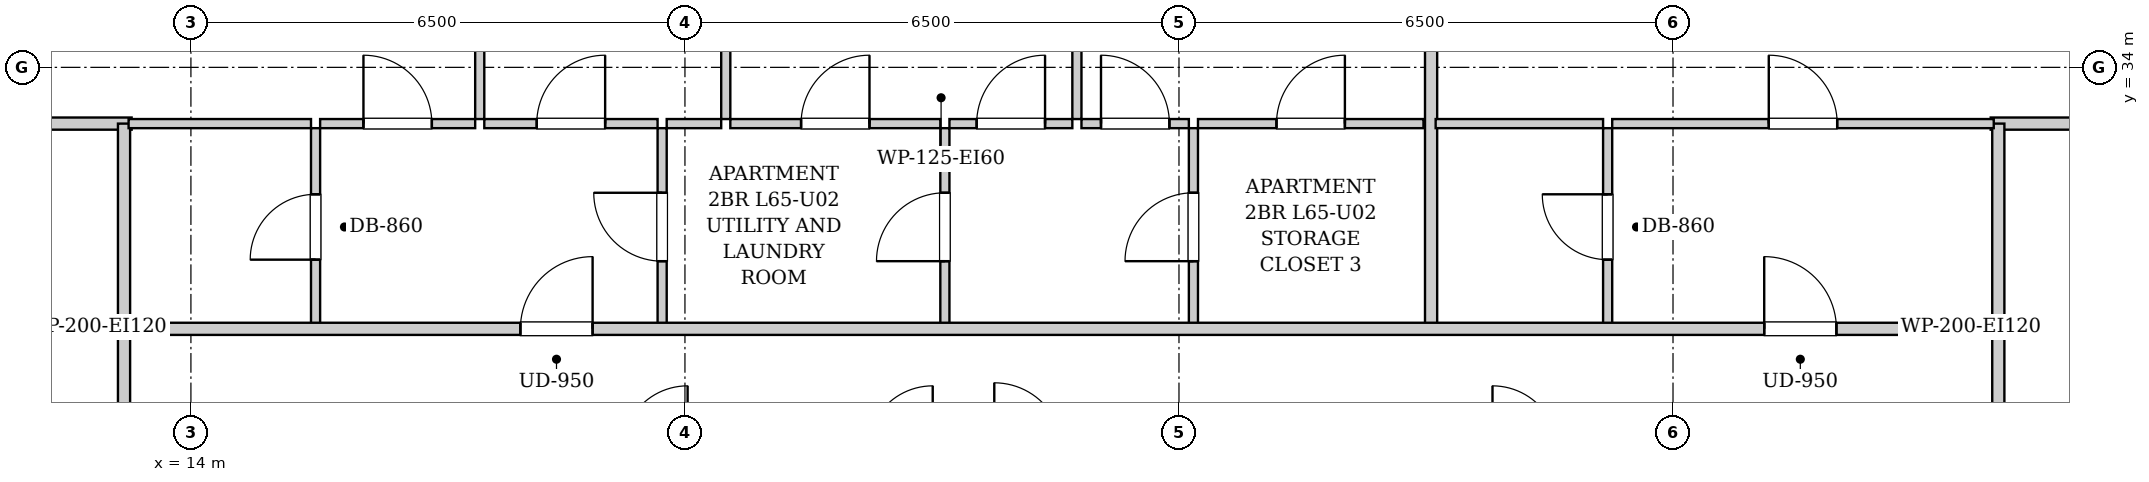
"""IFC4 building model, lengths in metres.
Left out: names, types, materials, properties, quantities, classifications, styles, units other than length and angle.
Written with IfcOpenShell. Run it as: python <this file> out.ifc"""

import sys

from ifc_helpers import new_model, si_unit, direction, frame, frame_2d, origin, place, context, subcontext, project, spatial, rectangle, extrude, element, fill, save


model = new_model("IFC4")
c1 = context("Model", 3, precision=1e-05, world=origin(), true_north=direction((0.0, 1.0)))
c2 = subcontext(c1, "Body", "Model", "MODEL_VIEW")
j1 = project(units=[si_unit("LENGTHUNIT", "METRE"), si_unit("PLANEANGLEUNIT", "RADIAN")], contexts=[c1])
p1 = place(None, origin())
s1 = spatial("IfcSite", under=j1, at=p1, CompositionType="ELEMENT")
p2 = place(p1, origin())
s2 = spatial("IfcBuilding", under=s1, at=p2, CompositionType="ELEMENT")
p3 = place(p2, frame((0.0, 0.0, 224.1)))
s3 = spatial("IfcBuildingStorey", under=s2, at=p3, CompositionType="ELEMENT", Elevation=224.1)
for number, where, z_axis, x_axis in (
    (1, (13.12, 28.98, 0.0), (0.0, 0.0, 1.0), (0.0, 1.0, 0.0)),
    (2, (37.78, 28.98, 0.0), (0.0, 0.0, 1.0), (0.0, 1.0, 0.0)),
):
    element("IfcWall", number, at=place(p3, frame(where, z_axis=z_axis, x_axis=x_axis)), inside=s3, PredefinedType="PARTITIONING", context=c2, shape_type="SweptSolid", body=[
        extrude(rectangle(XDim=1.58, YDim=0.16, at=frame_2d((0.79, 0.0))), origin(), (0.0, 0.0, 1.0), 3.14),
    ])
p4 = place(p3, frame((10.88, 33.26, 0.0), z_axis=(0.0, 0.0, 1.0), x_axis=(1.0, 0.0, 0.0)))
e3 = element("IfcWall", 3, at=p4, inside=s3, PredefinedType="PARTITIONING", context=c2, shape_type="SweptSolid", body=[
    extrude(rectangle(XDim=2.34, YDim=0.16, at=frame_2d((1.17, 0.0))), origin(), (0.0, 0.0, 1.0), 3.14),
])
p5 = place(p3, frame((13.12, 30.6, 0.0), z_axis=(0.0, 0.0, 1.0), x_axis=(0.0, 1.0, 0.0)))
e4 = element("IfcWall", 4, at=p5, inside=s3, PredefinedType="PARTITIONING", context=c2, shape_type="SweptSolid", body=[
    extrude(rectangle(XDim=2.66, YDim=0.16, at=frame_2d((1.33, 0.0))), origin(), (0.0, 0.0, 1.0), 3.14),
])
p6 = place(p3, frame((15.64, 30.6, 0.0), z_axis=(0.0, 0.0, 1.0), x_axis=(0.0, 1.0, 0.0)))
e5 = element("IfcWall", 5, at=p6, inside=s3, PredefinedType="PARTITIONING", context=c2, shape_type="SweptSolid", body=[
    extrude(rectangle(XDim=2.6, YDim=0.12, at=frame_2d((1.3, 0.0))), origin(), (0.0, 0.0, 1.0), 3.14),
])
p7 = place(p6, frame((0.87, 0.0, 0.0)))
e6 = element("IfcOpeningElement", 6, at=p7, cuts=e5, PredefinedType="OPENING", context=c2, shape_type="SweptSolid", body=[
    extrude(rectangle(XDim=0.86, YDim=2.05, at=frame_2d((0.43, 1.025))), frame((0.0, 0.07, 0.0), z_axis=(0.0, -1.0, 0.0), x_axis=(1.0, 0.0, 0.0)), (0.0, 0.0, 1.0), 0.14),
])
p8 = place(p3, frame((13.18, 33.26, 0.0), z_axis=(0.0, 0.0, 1.0), x_axis=(1.0, 0.0, 0.0)))
e7 = element("IfcWall", 7, at=p8, inside=s3, PredefinedType="PARTITIONING", context=c2, shape_type="SweptSolid", body=[
    extrude(rectangle(XDim=2.4, YDim=0.12, at=frame_2d((1.2, 0.0))), origin(), (0.0, 0.0, 1.0), 3.14),
])
p9 = place(p3, frame((20.2, 30.6, 0.0), z_axis=(0.0, 0.0, 1.0), x_axis=(0.0, 1.0, 0.0)))
e8 = element("IfcWall", 8, at=p9, inside=s3, PredefinedType="PARTITIONING", context=c2, shape_type="SweptSolid", body=[
    extrude(rectangle(XDim=2.6, YDim=0.12, at=frame_2d((1.3, 0.0))), origin(), (0.0, 0.0, 1.0), 3.14),
])
p10 = place(p9, frame((0.85, 0.0, 0.0)))
e9 = element("IfcOpeningElement", 9, at=p10, cuts=e8, PredefinedType="OPENING", context=c2, shape_type="SweptSolid", body=[
    extrude(rectangle(XDim=0.9, YDim=2.05, at=frame_2d((0.45, 1.025))), frame((0.0, 0.07, 0.0), z_axis=(0.0, -1.0, 0.0), x_axis=(1.0, 0.0, 0.0)), (0.0, 0.0, 1.0), 0.14),
])
p11 = place(p3, frame((15.7, 33.26, 0.0), z_axis=(0.0, 0.0, 1.0), x_axis=(1.0, 0.0, 0.0)))
e10 = element("IfcWall", 10, at=p11, inside=s3, PredefinedType="PARTITIONING", context=c2, shape_type="SweptSolid", body=[
    extrude(rectangle(XDim=2.04, YDim=0.12, at=frame_2d((1.02, 0.0))), origin(), (0.0, 0.0, 1.0), 3.14),
])
p12 = place(p11, frame((0.57, 0.0, 0.0)))
e11 = element("IfcOpeningElement", 11, at=p12, cuts=e10, PredefinedType="OPENING", context=c2, shape_type="SweptSolid", body=[
    extrude(rectangle(XDim=0.9, YDim=2.05, at=frame_2d((0.45, 1.025))), frame((0.0, 0.07, 0.0), z_axis=(0.0, -1.0, 0.0), x_axis=(1.0, 0.0, 0.0)), (0.0, 0.0, 1.0), 0.14),
])
p13 = place(p3, frame((17.86, 33.26, 0.0), z_axis=(0.0, 0.0, 1.0), x_axis=(1.0, 0.0, 0.0)))
e12 = element("IfcWall", 12, at=p13, inside=s3, PredefinedType="PARTITIONING", context=c2, shape_type="SweptSolid", body=[
    extrude(rectangle(XDim=2.28, YDim=0.12, at=frame_2d((1.14, 0.0))), origin(), (0.0, 0.0, 1.0), 3.14),
])
p14 = place(p13, frame((0.69, 0.0, 0.0)))
e13 = element("IfcOpeningElement", 13, at=p14, cuts=e12, PredefinedType="OPENING", context=c2, shape_type="SweptSolid", body=[
    extrude(rectangle(XDim=0.9, YDim=2.05, at=frame_2d((0.45, 1.025))), frame((0.0, 0.07, 0.0), z_axis=(0.0, -1.0, 0.0), x_axis=(1.0, 0.0, 0.0)), (0.0, 0.0, 1.0), 0.14),
])
p15 = place(p3, frame((23.92, 30.6, 0.0), z_axis=(0.0, 0.0, 1.0), x_axis=(0.0, 1.0, 0.0)))
e14 = element("IfcWall", 14, at=p15, inside=s3, PredefinedType="PARTITIONING", context=c2, shape_type="SweptSolid", body=[
    extrude(rectangle(XDim=2.6, YDim=0.12, at=frame_2d((1.3, 0.0))), origin(), (0.0, 0.0, 1.0), 3.14),
])
p16 = place(p15, frame((0.85, 0.0, 0.0)))
e15 = element("IfcOpeningElement", 15, at=p16, cuts=e14, PredefinedType="OPENING", context=c2, shape_type="SweptSolid", body=[
    extrude(rectangle(XDim=0.9, YDim=2.05, at=frame_2d((0.45, 1.025))), frame((0.0, 0.07, 0.0), z_axis=(0.0, -1.0, 0.0), x_axis=(1.0, 0.0, 0.0)), (0.0, 0.0, 1.0), 0.14),
])
p17 = place(p3, frame((20.26, 33.26, 0.0), z_axis=(0.0, 0.0, 1.0), x_axis=(1.0, 0.0, 0.0)))
e16 = element("IfcWall", 16, at=p17, inside=s3, PredefinedType="PARTITIONING", context=c2, shape_type="SweptSolid", body=[
    extrude(rectangle(XDim=0.717, YDim=0.12, at=frame_2d((0.358, 0.0))), origin(), (0.0, 0.0, 1.0), 3.14),
])
p18 = place(p3, frame((21.097, 33.26, 0.0), z_axis=(0.0, 0.0, 1.0), x_axis=(1.0, 0.0, 0.0)))
e17 = element("IfcWall", 17, at=p18, inside=s3, PredefinedType="PARTITIONING", context=c2, shape_type="SweptSolid", body=[
    extrude(rectangle(XDim=2.763, YDim=0.12, at=frame_2d((1.382, 0.0))), origin(), (0.0, 0.0, 1.0), 3.14),
])
p19 = place(p18, frame((0.931, 0.0, 0.0)))
e18 = element("IfcOpeningElement", 18, at=p19, cuts=e17, PredefinedType="OPENING", context=c2, shape_type="SweptSolid", body=[
    extrude(rectangle(XDim=0.9, YDim=2.05, at=frame_2d((0.45, 1.025))), frame((0.0, 0.07, 0.0), z_axis=(0.0, -1.0, 0.0), x_axis=(1.0, 0.0, 0.0)), (0.0, 0.0, 1.0), 0.14),
])
p20 = place(p3, frame((27.19, 30.6, 0.0), z_axis=(0.0, 0.0, 1.0), x_axis=(0.0, 1.0, 0.0)))
e19 = element("IfcWall", 19, at=p20, inside=s3, PredefinedType="PARTITIONING", context=c2, shape_type="SweptSolid", body=[
    extrude(rectangle(XDim=2.6, YDim=0.12, at=frame_2d((1.3, 0.0))), origin(), (0.0, 0.0, 1.0), 3.14),
])
p21 = place(p20, frame((0.85, 0.0, 0.0)))
e20 = element("IfcOpeningElement", 20, at=p21, cuts=e19, PredefinedType="OPENING", context=c2, shape_type="SweptSolid", body=[
    extrude(rectangle(XDim=0.9, YDim=2.05, at=frame_2d((0.45, 1.025))), frame((0.0, 0.07, 0.0), z_axis=(0.0, -1.0, 0.0), x_axis=(1.0, 0.0, 0.0)), (0.0, 0.0, 1.0), 0.14),
])
p22 = place(p3, frame((23.98, 33.26, 0.0), z_axis=(0.0, 0.0, 1.0), x_axis=(1.0, 0.0, 0.0)))
e21 = element("IfcWall", 21, at=p22, inside=s3, PredefinedType="PARTITIONING", context=c2, shape_type="SweptSolid", body=[
    extrude(rectangle(XDim=1.617, YDim=0.12, at=frame_2d((0.809, 0.0))), origin(), (0.0, 0.0, 1.0), 3.14),
])
p23 = place(p22, frame((0.358, 0.0, 0.0)))
e22 = element("IfcOpeningElement", 22, at=p23, cuts=e21, PredefinedType="OPENING", context=c2, shape_type="SweptSolid", body=[
    extrude(rectangle(XDim=0.9, YDim=2.05, at=frame_2d((0.45, 1.025))), frame((0.0, 0.07, 0.0), z_axis=(0.0, -1.0, 0.0), x_axis=(1.0, 0.0, 0.0)), (0.0, 0.0, 1.0), 0.14),
])
p24 = place(p3, frame((25.717, 33.26, 0.0), z_axis=(0.0, 0.0, 1.0), x_axis=(1.0, 0.0, 0.0)))
e23 = element("IfcWall", 23, at=p24, inside=s3, PredefinedType="PARTITIONING", context=c2, shape_type="SweptSolid", body=[
    extrude(rectangle(XDim=1.413, YDim=0.12, at=frame_2d((0.707, 0.0))), origin(), (0.0, 0.0, 1.0), 3.14),
])
p25 = place(p24, frame((0.257, 0.0, 0.0)))
e24 = element("IfcOpeningElement", 24, at=p25, cuts=e23, PredefinedType="OPENING", context=c2, shape_type="SweptSolid", body=[
    extrude(rectangle(XDim=0.9, YDim=2.05, at=frame_2d((0.45, 1.025))), frame((0.0, 0.07, 0.0), z_axis=(0.0, -1.0, 0.0), x_axis=(1.0, 0.0, 0.0)), (0.0, 0.0, 1.0), 0.14),
])
p26 = place(p3, frame((27.25, 33.26, 0.0), z_axis=(0.0, 0.0, 1.0), x_axis=(1.0, 0.0, 0.0)))
e25 = element("IfcWall", 25, at=p26, inside=s3, PredefinedType="PARTITIONING", context=c2, shape_type="SweptSolid", body=[
    extrude(rectangle(XDim=2.967, YDim=0.12, at=frame_2d((1.483, 0.0))), origin(), (0.0, 0.0, 1.0), 3.14),
])
p27 = place(p26, frame((1.033, 0.0, 0.0)))
e26 = element("IfcOpeningElement", 26, at=p27, cuts=e25, PredefinedType="OPENING", context=c2, shape_type="SweptSolid", body=[
    extrude(rectangle(XDim=0.9, YDim=2.05, at=frame_2d((0.45, 1.025))), frame((0.0, 0.07, 0.0), z_axis=(0.0, -1.0, 0.0), x_axis=(1.0, 0.0, 0.0)), (0.0, 0.0, 1.0), 0.14),
])
p28 = place(p3, frame((17.8, 33.32, 0.0), z_axis=(0.0, 0.0, 1.0), x_axis=(0.0, 1.0, 0.0)))
e27 = element("IfcWall", 27, at=p28, inside=s3, PredefinedType="PARTITIONING", context=c2, shape_type="SweptSolid", body=[
    extrude(rectangle(XDim=6.6, YDim=0.12, at=frame_2d((3.3, 0.0))), origin(), (0.0, 0.0, 1.0), 2.668),
])
p29 = place(p28, frame((2.835, 0.0, 0.0)))
e28 = element("IfcOpeningElement", 28, at=p29, cuts=e27, PredefinedType="OPENING", context=c2, shape_type="SweptSolid", body=[
    extrude(rectangle(XDim=0.9, YDim=2.05, at=frame_2d((0.45, 1.025))), frame((0.0, 0.07, 0.0), z_axis=(0.0, -1.0, 0.0), x_axis=(1.0, 0.0, 0.0)), (0.0, 0.0, 1.0), 0.14),
])
p30 = place(p3, frame((21.037, 33.32, 0.0), z_axis=(0.0, 0.0, 1.0), x_axis=(0.0, 1.0, 0.0)))
e29 = element("IfcWall", 29, at=p30, inside=s3, PredefinedType="PARTITIONING", context=c2, shape_type="SweptSolid", body=[
    extrude(rectangle(XDim=6.6, YDim=0.12, at=frame_2d((3.3, 0.0))), origin(), (0.0, 0.0, 1.0), 3.14),
])
p31 = place(p30, frame((2.835, 0.0, 0.0)))
e30 = element("IfcOpeningElement", 30, at=p31, cuts=e29, PredefinedType="OPENING", context=c2, shape_type="SweptSolid", body=[
    extrude(rectangle(XDim=0.9, YDim=2.05, at=frame_2d((0.45, 1.025))), frame((0.0, 0.07, 0.0), z_axis=(0.0, -1.0, 0.0), x_axis=(1.0, 0.0, 0.0)), (0.0, 0.0, 1.0), 0.14),
])
p32 = place(p3, frame((25.657, 33.32, 0.0), z_axis=(0.0, 0.0, 1.0), x_axis=(0.0, 1.0, 0.0)))
e31 = element("IfcWall", 31, at=p32, inside=s3, PredefinedType="PARTITIONING", context=c2, shape_type="SweptSolid", body=[
    extrude(rectangle(XDim=6.6, YDim=0.12, at=frame_2d((3.3, 0.0))), origin(), (0.0, 0.0, 1.0), 3.14),
])
p33 = place(p32, frame((2.835, 0.0, 0.0)))
e32 = element("IfcOpeningElement", 32, at=p33, cuts=e31, PredefinedType="OPENING", context=c2, shape_type="SweptSolid", body=[
    extrude(rectangle(XDim=0.9, YDim=2.05, at=frame_2d((0.45, 1.025))), frame((0.0, 0.07, 0.0), z_axis=(0.0, -1.0, 0.0), x_axis=(1.0, 0.0, 0.0)), (0.0, 0.0, 1.0), 0.14),
])
p34 = place(p3, frame((37.68, 33.26, 0.0), z_axis=(0.0, 0.0, 1.0), x_axis=(1.0, 0.0, 0.0)))
e33 = element("IfcWall", 33, at=p34, inside=s3, PredefinedType="PARTITIONING", context=c2, shape_type="SweptSolid", body=[
    extrude(rectangle(XDim=2.34, YDim=0.16, at=frame_2d((1.17, 0.0))), origin(), (0.0, 0.0, 1.0), 3.14),
])
p35 = place(p3, frame((37.78, 30.6, 0.0), z_axis=(0.0, 0.0, 1.0), x_axis=(0.0, 1.0, 0.0)))
e34 = element("IfcWall", 34, at=p35, inside=s3, PredefinedType="PARTITIONING", context=c2, shape_type="SweptSolid", body=[
    extrude(rectangle(XDim=2.66, YDim=0.16, at=frame_2d((1.33, 0.0))), origin(), (0.0, 0.0, 1.0), 3.14),
])
p36 = place(p3, frame((30.317, 30.6, 0.0), z_axis=(0.0, 0.0, 1.0), x_axis=(0.0, 1.0, 0.0)))
e35 = element("IfcWall", 35, at=p36, inside=s3, PredefinedType="PARTITIONING", context=c2, shape_type="SweptSolid", body=[
    extrude(rectangle(XDim=9.32, YDim=0.16, at=frame_2d((4.66, 0.0))), origin(), (0.0, 0.0, 1.0), 3.14),
])
p37 = place(p3, frame((32.64, 30.6, 0.0), z_axis=(0.0, 0.0, 1.0), x_axis=(0.0, 1.0, 0.0)))
e36 = element("IfcWall", 36, at=p37, inside=s3, PredefinedType="PARTITIONING", context=c2, shape_type="SweptSolid", body=[
    extrude(rectangle(XDim=2.6, YDim=0.12, at=frame_2d((1.3, 0.0))), origin(), (0.0, 0.0, 1.0), 3.14),
])
p38 = place(p37, frame((0.87, 0.0, 0.0)))
e37 = element("IfcOpeningElement", 37, at=p38, cuts=e36, PredefinedType="OPENING", context=c2, shape_type="SweptSolid", body=[
    extrude(rectangle(XDim=0.86, YDim=2.05, at=frame_2d((0.43, 1.025))), frame((0.0, 0.07, 0.0), z_axis=(0.0, -1.0, 0.0), x_axis=(1.0, 0.0, 0.0)), (0.0, 0.0, 1.0), 0.14),
])
p39 = place(p3, frame((30.377, 33.26, 0.0), z_axis=(0.0, 0.0, 1.0), x_axis=(1.0, 0.0, 0.0)))
e38 = element("IfcWall", 38, at=p39, inside=s3, PredefinedType="PARTITIONING", context=c2, shape_type="SweptSolid", body=[
    extrude(rectangle(XDim=2.203, YDim=0.12, at=frame_2d((1.102, 0.0))), origin(), (0.0, 0.0, 1.0), 3.14),
])
p40 = place(p3, frame((32.7, 33.26, 0.0), z_axis=(0.0, 0.0, 1.0), x_axis=(1.0, 0.0, 0.0)))
e39 = element("IfcWall", 39, at=p40, inside=s3, PredefinedType="PARTITIONING", context=c2, shape_type="SweptSolid", body=[
    extrude(rectangle(XDim=5.02, YDim=0.12, at=frame_2d((2.51, 0.0))), origin(), (0.0, 0.0, 1.0), 3.14),
])
p41 = place(p40, frame((2.06, 0.0, 0.0)))
e40 = element("IfcOpeningElement", 40, at=p41, cuts=e39, PredefinedType="OPENING", context=c2, shape_type="SweptSolid", body=[
    extrude(rectangle(XDim=0.9, YDim=2.05, at=frame_2d((0.45, 1.025))), frame((0.0, 0.07, 0.0), z_axis=(0.0, -1.0, 0.0), x_axis=(1.0, 0.0, 0.0)), (0.0, 0.0, 1.0), 0.14),
])
p42 = place(p3, frame((13.15, 30.56, 0.0), z_axis=(0.0, 0.0, 1.0), x_axis=(1.0, 0.0, 0.0)))
e41 = element("IfcWall", 41, at=p42, inside=s3, PredefinedType="PARTITIONING", context=c2, shape_type="SweptSolid", body=[
    extrude(rectangle(XDim=24.6, YDim=0.16, at=frame_2d((12.3, 0.0))), origin(), (0.0, 0.0, 1.0), 3.14),
])
p43 = place(p42, frame((5.185, 0.0, 0.0)))
e42 = element("IfcOpeningElement", 42, at=p43, cuts=e41, PredefinedType="OPENING", context=c2, shape_type="SweptSolid", body=[
    extrude(rectangle(XDim=0.95, YDim=2.1, at=frame_2d((0.475, 1.05))), frame((0.0, 0.09, 0.0), z_axis=(0.0, -1.0, 0.0), x_axis=(1.0, 0.0, 0.0)), (0.0, 0.0, 1.0), 0.18),
])
p44 = place(p42, frame((21.55, 0.0, 0.0)))
e43 = element("IfcOpeningElement", 43, at=p44, cuts=e41, PredefinedType="OPENING", context=c2, shape_type="SweptSolid", body=[
    extrude(rectangle(XDim=0.95, YDim=2.1, at=frame_2d((0.475, 1.05))), frame((0.0, 0.09, 0.0), z_axis=(0.0, -1.0, 0.0), x_axis=(1.0, 0.0, 0.0)), (0.0, 0.0, 1.0), 0.18),
])
p45 = place(p7, origin())
e44 = element("IfcDoor", 44, at=p45, inside=s3, OperationType="SINGLE_SWING_LEFT", PredefinedType="DOOR", context=c2, shape_type="SweptSolid", body=[
    extrude(rectangle(XDim=0.86, YDim=2.05, at=frame_2d((0.43, 1.025))), frame((0.0, 0.025, 0.0), z_axis=(0.0, -1.0, 0.0), x_axis=(1.0, 0.0, 0.0)), (0.0, 0.0, 1.0), 0.05),
])
fill(e6, e44)
p46 = place(p10, origin())
e45 = element("IfcDoor", 45, at=p46, inside=s3, OperationType="SINGLE_SWING_RIGHT", PredefinedType="DOOR", context=c2, shape_type="SweptSolid", body=[
    extrude(rectangle(XDim=0.9, YDim=2.05, at=frame_2d((0.45, 1.025))), frame((0.0, 0.025, 0.0), z_axis=(0.0, -1.0, 0.0), x_axis=(1.0, 0.0, 0.0)), (0.0, 0.0, 1.0), 0.05),
])
fill(e9, e45)
p47 = place(p12, origin())
e46 = element("IfcDoor", 46, at=p47, inside=s3, OperationType="SINGLE_SWING_LEFT", PredefinedType="DOOR", context=c2, shape_type="SweptSolid", body=[
    extrude(rectangle(XDim=0.9, YDim=2.05, at=frame_2d((0.45, 1.025))), frame((0.0, 0.025, 0.0), z_axis=(0.0, -1.0, 0.0), x_axis=(1.0, 0.0, 0.0)), (0.0, 0.0, 1.0), 0.05),
])
fill(e11, e46)
p48 = place(p14, origin())
e47 = element("IfcDoor", 47, at=p48, inside=s3, OperationType="SINGLE_SWING_RIGHT", PredefinedType="DOOR", context=c2, shape_type="SweptSolid", body=[
    extrude(rectangle(XDim=0.9, YDim=2.05, at=frame_2d((0.45, 1.025))), frame((0.0, 0.025, 0.0), z_axis=(0.0, -1.0, 0.0), x_axis=(1.0, 0.0, 0.0)), (0.0, 0.0, 1.0), 0.05),
])
fill(e13, e47)
p49 = place(p16, origin())
e48 = element("IfcDoor", 48, at=p49, inside=s3, OperationType="SINGLE_SWING_LEFT", PredefinedType="DOOR", context=c2, shape_type="SweptSolid", body=[
    extrude(rectangle(XDim=0.9, YDim=2.05, at=frame_2d((0.45, 1.025))), frame((0.0, 0.025, 0.0), z_axis=(0.0, -1.0, 0.0), x_axis=(1.0, 0.0, 0.0)), (0.0, 0.0, 1.0), 0.05),
])
fill(e15, e48)
p50 = place(p19, origin())
e49 = element("IfcDoor", 49, at=p50, inside=s3, OperationType="SINGLE_SWING_RIGHT", PredefinedType="DOOR", context=c2, shape_type="SweptSolid", body=[
    extrude(rectangle(XDim=0.9, YDim=2.05, at=frame_2d((0.45, 1.025))), frame((0.0, 0.025, 0.0), z_axis=(0.0, -1.0, 0.0), x_axis=(1.0, 0.0, 0.0)), (0.0, 0.0, 1.0), 0.05),
])
fill(e18, e49)
p51 = place(p21, origin())
e50 = element("IfcDoor", 50, at=p51, inside=s3, OperationType="SINGLE_SWING_LEFT", PredefinedType="DOOR", context=c2, shape_type="SweptSolid", body=[
    extrude(rectangle(XDim=0.9, YDim=2.05, at=frame_2d((0.45, 1.025))), frame((0.0, 0.025, 0.0), z_axis=(0.0, -1.0, 0.0), x_axis=(1.0, 0.0, 0.0)), (0.0, 0.0, 1.0), 0.05),
])
fill(e20, e50)
p52 = place(p23, origin())
e51 = element("IfcDoor", 51, at=p52, inside=s3, OperationType="SINGLE_SWING_RIGHT", PredefinedType="DOOR", context=c2, shape_type="SweptSolid", body=[
    extrude(rectangle(XDim=0.9, YDim=2.05, at=frame_2d((0.45, 1.025))), frame((0.0, 0.025, 0.0), z_axis=(0.0, -1.0, 0.0), x_axis=(1.0, 0.0, 0.0)), (0.0, 0.0, 1.0), 0.05),
])
fill(e22, e51)
p53 = place(p25, origin())
e52 = element("IfcDoor", 52, at=p53, inside=s3, OperationType="SINGLE_SWING_LEFT", PredefinedType="DOOR", context=c2, shape_type="SweptSolid", body=[
    extrude(rectangle(XDim=0.9, YDim=2.05, at=frame_2d((0.45, 1.025))), frame((0.0, 0.025, 0.0), z_axis=(0.0, -1.0, 0.0), x_axis=(1.0, 0.0, 0.0)), (0.0, 0.0, 1.0), 0.05),
])
fill(e24, e52)
p54 = place(p27, origin())
e53 = element("IfcDoor", 53, at=p54, inside=s3, OperationType="SINGLE_SWING_RIGHT", PredefinedType="DOOR", context=c2, shape_type="SweptSolid", body=[
    extrude(rectangle(XDim=0.9, YDim=2.05, at=frame_2d((0.45, 1.025))), frame((0.0, 0.025, 0.0), z_axis=(0.0, -1.0, 0.0), x_axis=(1.0, 0.0, 0.0)), (0.0, 0.0, 1.0), 0.05),
])
fill(e26, e53)
p55 = place(p38, origin())
e54 = element("IfcDoor", 54, at=p55, inside=s3, OperationType="SINGLE_SWING_RIGHT", PredefinedType="DOOR", context=c2, shape_type="SweptSolid", body=[
    extrude(rectangle(XDim=0.86, YDim=2.05, at=frame_2d((0.43, 1.025))), frame((0.0, 0.025, 0.0), z_axis=(0.0, -1.0, 0.0), x_axis=(1.0, 0.0, 0.0)), (0.0, 0.0, 1.0), 0.05),
])
fill(e37, e54)
p56 = place(p41, origin())
e55 = element("IfcDoor", 55, at=p56, inside=s3, OperationType="SINGLE_SWING_LEFT", PredefinedType="DOOR", context=c2, shape_type="SweptSolid", body=[
    extrude(rectangle(XDim=0.9, YDim=2.05, at=frame_2d((0.45, 1.025))), frame((0.0, 0.025, 0.0), z_axis=(0.0, -1.0, 0.0), x_axis=(1.0, 0.0, 0.0)), (0.0, 0.0, 1.0), 0.05),
])
fill(e40, e55)
p57 = place(p43, origin())
e56 = element("IfcDoor", 56, at=p57, inside=s3, OperationType="SINGLE_SWING_RIGHT", PredefinedType="DOOR", context=c2, shape_type="SweptSolid", body=[
    extrude(rectangle(XDim=0.95, YDim=2.1, at=frame_2d((0.475, 1.05))), frame((0.0, 0.025, 0.0), z_axis=(0.0, -1.0, 0.0), x_axis=(1.0, 0.0, 0.0)), (0.0, 0.0, 1.0), 0.05),
])
fill(e42, e56)
p58 = place(p44, origin())
e57 = element("IfcDoor", 57, at=p58, inside=s3, OperationType="SINGLE_SWING_LEFT", PredefinedType="DOOR", context=c2, shape_type="SweptSolid", body=[
    extrude(rectangle(XDim=0.95, YDim=2.1, at=frame_2d((0.475, 1.05))), frame((0.0, 0.025, 0.0), z_axis=(0.0, -1.0, 0.0), x_axis=(1.0, 0.0, 0.0)), (0.0, 0.0, 1.0), 0.05),
])
fill(e43, e57)
save(model, sys.argv[1])
